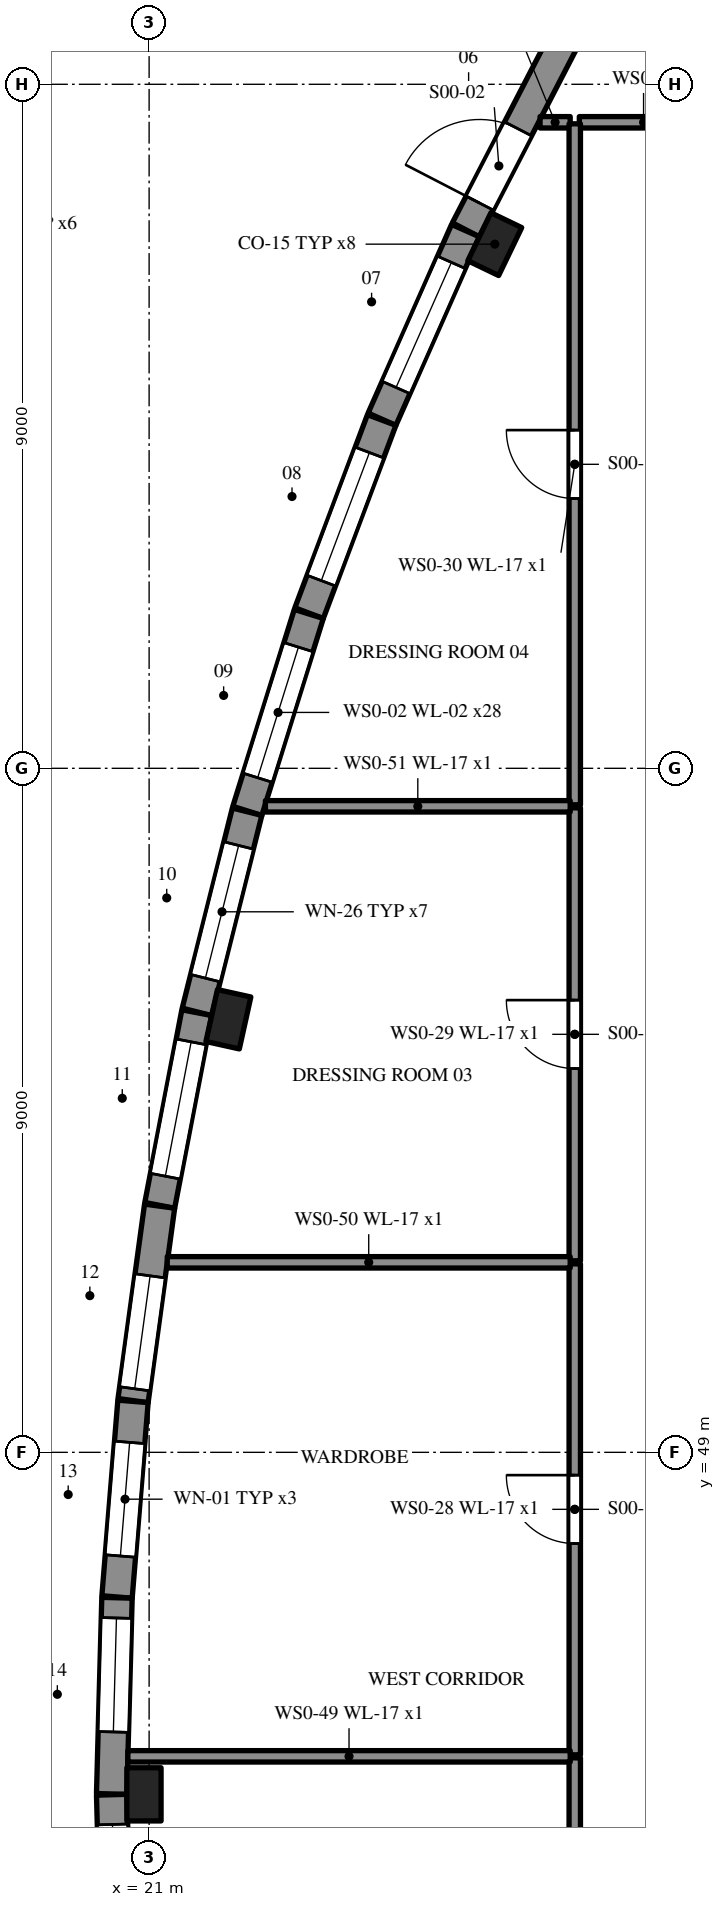
"""IFC4 building model, lengths in metres.
Left out: names, types, materials, properties, quantities, classifications, styles, units other than length and angle.
Written with IfcOpenShell. Run it as: python <this file> out.ifc"""

import sys

from ifc_helpers import new_model, si_unit, direction, frame, frame_2d, origin, origin_2d, place, context, subcontext, project, spatial, rectangle, extrude, element, fill, save


model = new_model("IFC4")
c1 = context("Model", 3, precision=1e-05, world=origin(), true_north=direction((0.0, 1.0)))
c2 = subcontext(c1, "Body", "Model", "MODEL_VIEW")
j1 = project(units=[si_unit("LENGTHUNIT", "METRE"), si_unit("PLANEANGLEUNIT", "RADIAN")], contexts=[c1])
p1 = place(None, origin())
s1 = spatial("IfcSite", under=j1, at=p1, CompositionType="ELEMENT")
p2 = place(p1, origin())
s2 = spatial("IfcBuilding", under=s1, at=p2, CompositionType="ELEMENT")
p3 = place(p2, origin())
s3 = spatial("IfcBuildingStorey", under=s2, at=p3, CompositionType="ELEMENT", Elevation=0.0)
p4 = place(p3, frame((26.572, 67.802, 0.0), z_axis=(0.0, 0.0, 1.0), x_axis=(-0.45930565039, -0.888278289457, 0.0)))
e1 = element("IfcWall", 1, at=p4, inside=s3, PredefinedType="SOLIDWALL", context=c2, shape_type="SweptSolid", body=[
    extrude(rectangle(XDim=3.059, YDim=0.4, at=frame_2d((1.529, 0.0))), origin(), (0.0, 0.0, 1.0), 5.1),
])
p5 = place(p4, frame((1.563, 0.0, 0.0)))
e2 = element("IfcOpeningElement", 2, at=p5, cuts=e1, PredefinedType="OPENING", context=c2, shape_type="SweptSolid", body=[
    extrude(rectangle(XDim=1.1, YDim=2.1, at=frame_2d((0.55, 1.05))), frame((0.0, 0.21, 0.0), z_axis=(0.0, -1.0, 0.0), x_axis=(1.0, 0.0, 0.0)), (0.0, 0.0, 1.0), 0.42),
])
p6 = place(p3, frame((25.162, 65.075, 0.0), z_axis=(0.0, 0.0, 1.0), x_axis=(-0.404652153757, -0.914470685402, 0.0)))
e3 = element("IfcWall", 3, at=p6, inside=s3, PredefinedType="SOLIDWALL", context=c2, shape_type="SweptSolid", body=[
    extrude(rectangle(XDim=2.714, YDim=0.4, at=frame_2d((1.357, 0.0))), origin(), (0.0, 0.0, 1.0), 5.1),
])
p7 = place(p6, frame((0.457, 0.0, 1.2)))
e4 = element("IfcOpeningElement", 4, at=p7, cuts=e3, PredefinedType="OPENING", context=c2, shape_type="SweptSolid", body=[
    extrude(rectangle(XDim=1.8, YDim=1.2, at=frame_2d((0.9, 0.6))), frame((0.0, 0.21, 0.0), z_axis=(0.0, -1.0, 0.0), x_axis=(1.0, 0.0, 0.0)), (0.0, 0.0, 1.0), 0.42),
])
p8 = place(p3, frame((24.06, 62.583, 0.0), z_axis=(0.0, 0.0, 1.0), x_axis=(-0.351862601417, -0.936051659752, 0.0)))
e5 = element("IfcWall", 5, at=p8, inside=s3, PredefinedType="SOLIDWALL", context=c2, shape_type="SweptSolid", body=[
    extrude(rectangle(XDim=2.714, YDim=0.4, at=frame_2d((1.357, 0.0))), origin(), (0.0, 0.0, 1.0), 5.1),
])
p9 = place(p8, frame((0.457, 0.0, 1.2)))
e6 = element("IfcOpeningElement", 6, at=p9, cuts=e5, PredefinedType="OPENING", context=c2, shape_type="SweptSolid", body=[
    extrude(rectangle(XDim=1.8, YDim=1.2, at=frame_2d((0.9, 0.6))), frame((0.0, 0.21, 0.0), z_axis=(0.0, -1.0, 0.0), x_axis=(1.0, 0.0, 0.0)), (0.0, 0.0, 1.0), 0.42),
])
p10 = place(p3, frame((23.101, 60.031, 0.0), z_axis=(0.0, 0.0, 1.0), x_axis=(-0.29795748067, -0.954579142718, 0.0)))
e7 = element("IfcWall", 7, at=p10, inside=s3, PredefinedType="SOLIDWALL", context=c2, shape_type="SweptSolid", body=[
    extrude(rectangle(XDim=2.715, YDim=0.4, at=frame_2d((1.357, 0.0))), origin(), (0.0, 0.0, 1.0), 5.1),
])
p11 = place(p10, frame((0.457, 0.0, 1.2)))
e8 = element("IfcOpeningElement", 8, at=p11, cuts=e7, PredefinedType="OPENING", context=c2, shape_type="SweptSolid", body=[
    extrude(rectangle(XDim=1.8, YDim=1.2, at=frame_2d((0.9, 0.6))), frame((0.0, 0.21, 0.0), z_axis=(0.0, -1.0, 0.0), x_axis=(1.0, 0.0, 0.0)), (0.0, 0.0, 1.0), 0.42),
])
p12 = place(p3, frame((22.289, 57.429, 0.0), z_axis=(0.0, 0.0, 1.0), x_axis=(-0.2430011368, -0.970026003525, 0.0)))
e9 = element("IfcWall", 9, at=p12, inside=s3, PredefinedType="SOLIDWALL", context=c2, shape_type="SweptSolid", body=[
    extrude(rectangle(XDim=2.715, YDim=0.4, at=frame_2d((1.357, 0.0))), origin(), (0.0, 0.0, 1.0), 5.1),
])
p13 = place(p12, frame((0.458, 0.0, 1.2)))
e10 = element("IfcOpeningElement", 10, at=p13, cuts=e9, PredefinedType="OPENING", context=c2, shape_type="SweptSolid", body=[
    extrude(rectangle(XDim=1.8, YDim=1.2, at=frame_2d((0.9, 0.6))), frame((0.0, 0.21, 0.0), z_axis=(0.0, -1.0, 0.0), x_axis=(1.0, 0.0, 0.0)), (0.0, 0.0, 1.0), 0.42),
])
p14 = place(p3, frame((21.627, 54.785, 0.0), z_axis=(0.0, 0.0, 1.0), x_axis=(-0.188763210152, -0.982022632373, 0.0)))
e11 = element("IfcWall", 11, at=p14, inside=s3, PredefinedType="SOLIDWALL", context=c2, shape_type="SweptSolid", body=[
    extrude(rectangle(XDim=2.582, YDim=0.4, at=frame_2d((1.291, 0.0))), origin(), (0.0, 0.0, 1.0), 5.1),
])
p15 = place(p14, frame((0.391, 0.0, 1.2)))
e12 = element("IfcOpeningElement", 12, at=p15, cuts=e11, PredefinedType="OPENING", context=c2, shape_type="SweptSolid", body=[
    extrude(rectangle(XDim=1.8, YDim=1.2, at=frame_2d((0.9, 0.6))), frame((0.0, 0.21, 0.0), z_axis=(0.0, -1.0, 0.0), x_axis=(1.0, 0.0, 0.0)), (0.0, 0.0, 1.0), 0.42),
])
p16 = place(p3, frame((21.138, 52.239, 0.0), z_axis=(0.0, 0.0, 1.0), x_axis=(-0.13522291824, -0.990815200924, 0.0)))
e13 = element("IfcWall", 13, at=p16, inside=s3, PredefinedType="SOLIDWALL", context=c2, shape_type="SweptSolid", body=[
    extrude(rectangle(XDim=2.582, YDim=0.4, at=frame_2d((1.291, 0.0))), origin(), (0.0, 0.0, 1.0), 5.1),
])
p17 = place(p16, frame((0.925, 0.0, 0.9)))
e14 = element("IfcOpeningElement", 14, at=p17, cuts=e13, PredefinedType="OPENING", context=c2, shape_type="SweptSolid", body=[
    extrude(rectangle(XDim=1.5, YDim=2.1, at=frame_2d((0.75, 1.05))), frame((0.0, 0.21, 0.0), z_axis=(0.0, -1.0, 0.0), x_axis=(1.0, 0.0, 0.0)), (0.0, 0.0, 1.0), 0.42),
])
p18 = place(p3, frame((20.788, 49.67, 0.0), z_axis=(0.0, 0.0, 1.0), x_axis=(-0.081323667998, -0.996687744995, 0.0)))
e15 = element("IfcWall", 15, at=p18, inside=s3, PredefinedType="SOLIDWALL", context=c2, shape_type="SweptSolid", body=[
    extrude(rectangle(XDim=2.582, YDim=0.4, at=frame_2d((1.291, 0.0))), origin(), (0.0, 0.0, 1.0), 5.1),
])
p19 = place(p18, frame((0.541, 0.0, 0.9)))
e16 = element("IfcOpeningElement", 16, at=p19, cuts=e15, PredefinedType="OPENING", context=c2, shape_type="SweptSolid", body=[
    extrude(rectangle(XDim=1.5, YDim=2.1, at=frame_2d((0.75, 1.05))), frame((0.0, 0.21, 0.0), z_axis=(0.0, -1.0, 0.0), x_axis=(1.0, 0.0, 0.0)), (0.0, 0.0, 1.0), 0.42),
])
p20 = place(p3, frame((20.577, 47.086, 0.0), z_axis=(0.0, 0.0, 1.0), x_axis=(-0.027139748682, -0.99963164918, 0.0)))
e17 = element("IfcWall", 17, at=p20, inside=s3, PredefinedType="SOLIDWALL", context=c2, shape_type="SweptSolid", body=[
    extrude(rectangle(XDim=2.582, YDim=0.4, at=frame_2d((1.291, 0.0))), origin(), (0.0, 0.0, 1.0), 5.1),
])
p21 = place(p20, frame((0.266, 0.0, 0.9)))
e18 = element("IfcOpeningElement", 18, at=p21, cuts=e17, PredefinedType="OPENING", context=c2, shape_type="SweptSolid", body=[
    extrude(rectangle(XDim=1.5, YDim=2.1, at=frame_2d((0.75, 1.05))), frame((0.0, 0.21, 0.0), z_axis=(0.0, -1.0, 0.0), x_axis=(1.0, 0.0, 0.0)), (0.0, 0.0, 1.0), 0.42),
])
p22 = place(p3, frame((20.507, 44.495, 0.0), z_axis=(0.0, 0.0, 1.0), x_axis=(0.027139748682, -0.99963164918, 0.0)))
e19 = element("IfcWall", 19, at=p22, inside=s3, PredefinedType="SOLIDWALL", context=c2, shape_type="SweptSolid", body=[
    extrude(rectangle(XDim=2.582, YDim=0.4, at=frame_2d((1.291, 0.0))), origin(), (0.0, 0.0, 1.0), 5.1),
])
p23 = place(p22, frame((0.391, 0.0, 1.2)))
e20 = element("IfcOpeningElement", 20, at=p23, cuts=e19, PredefinedType="OPENING", context=c2, shape_type="SweptSolid", body=[
    extrude(rectangle(XDim=1.8, YDim=1.2, at=frame_2d((0.9, 0.6))), frame((0.0, 0.21, 0.0), z_axis=(0.0, -1.0, 0.0), x_axis=(1.0, 0.0, 0.0)), (0.0, 0.0, 1.0), 0.42),
])
for number, where, z_axis, x_axis in (
    (21, (20.932, 44.5, 0.0), (0.0, 0.0, 1.0), (0.0, -1.0, 0.0)),
    (22, (22.043, 54.698, 0.0), (0.0, 0.0, 1.0), (-0.217, -0.976, 0.0)),
    (23, (25.548, 64.896, 0.0), (0.0, 0.0, 1.0), (-0.434, -0.901, 0.0)),
):
    element("IfcColumn", number, at=place(p3, frame(where, z_axis=z_axis, x_axis=x_axis)), inside=s3, PredefinedType="PILASTER", context=c2, shape_type="SweptSolid", body=[
        extrude(rectangle(XDim=0.7, YDim=0.45, at=origin_2d()), origin(), (0.0, 0.0, 1.0), 5.1),
    ])
p24 = place(p3, frame((28.351, 66.5, 0.0), z_axis=(0.0, 0.0, 1.0), x_axis=(-1.0, 0.0, 0.0)))
e24 = element("IfcWall", 24, at=p24, inside=s3, PredefinedType="PARTITIONING", context=c2, shape_type="SweptSolid", body=[
    extrude(rectangle(XDim=1.691, YDim=0.15, at=frame_2d((0.845, 0.0))), origin(), (0.0, 0.0, 1.0), 5.1),
])
p25 = place(p3, frame((26.54, 66.5, 0.0), z_axis=(0.0, 0.0, 1.0), x_axis=(-1.0, 0.0, 0.0)))
e25 = element("IfcWall", 25, at=p25, inside=s3, PredefinedType="PARTITIONING", context=c2, shape_type="SweptSolid", body=[
    extrude(rectangle(XDim=0.397, YDim=0.15, at=frame_2d((0.198, 0.0))), origin(), (0.0, 0.0, 1.0), 5.1),
])
p26 = place(p3, frame((26.6, 38.52, 0.0), z_axis=(0.0, 0.0, 1.0), x_axis=(0.0, 1.0, 0.0)))
e26 = element("IfcWall", 26, at=p26, inside=s3, PredefinedType="PARTITIONING", context=c2, shape_type="SweptSolid", body=[
    extrude(rectangle(XDim=6.46, YDim=0.15, at=frame_2d((3.23, 0.0))), origin(), (0.0, 0.0, 1.0), 5.1),
])
p27 = place(p26, frame((2.78, 0.0, 0.0)))
e27 = element("IfcOpeningElement", 27, at=p27, cuts=e26, PredefinedType="OPENING", context=c2, shape_type="SweptSolid", body=[
    extrude(rectangle(XDim=0.9, YDim=2.1, at=frame_2d((0.45, 1.05))), frame((0.0, 0.085, 0.0), z_axis=(0.0, -1.0, 0.0), x_axis=(1.0, 0.0, 0.0)), (0.0, 0.0, 1.0), 0.17),
])
p28 = place(p3, frame((26.6, 45.02, 0.0), z_axis=(0.0, 0.0, 1.0), x_axis=(0.0, 1.0, 0.0)))
e28 = element("IfcWall", 28, at=p28, inside=s3, PredefinedType="PARTITIONING", context=c2, shape_type="SweptSolid", body=[
    extrude(rectangle(XDim=6.46, YDim=0.15, at=frame_2d((3.23, 0.0))), origin(), (0.0, 0.0, 1.0), 5.1),
])
p29 = place(p28, frame((2.78, 0.0, 0.0)))
e29 = element("IfcOpeningElement", 29, at=p29, cuts=e28, PredefinedType="OPENING", context=c2, shape_type="SweptSolid", body=[
    extrude(rectangle(XDim=0.9, YDim=2.1, at=frame_2d((0.45, 1.05))), frame((0.0, 0.085, 0.0), z_axis=(0.0, -1.0, 0.0), x_axis=(1.0, 0.0, 0.0)), (0.0, 0.0, 1.0), 0.17),
])
p30 = place(p3, frame((26.6, 51.52, 0.0), z_axis=(0.0, 0.0, 1.0), x_axis=(0.0, 1.0, 0.0)))
e30 = element("IfcWall", 30, at=p30, inside=s3, PredefinedType="PARTITIONING", context=c2, shape_type="SweptSolid", body=[
    extrude(rectangle(XDim=5.96, YDim=0.15, at=frame_2d((2.98, 0.0))), origin(), (0.0, 0.0, 1.0), 5.1),
])
p31 = place(p30, frame((2.53, 0.0, 0.0)))
e31 = element("IfcOpeningElement", 31, at=p31, cuts=e30, PredefinedType="OPENING", context=c2, shape_type="SweptSolid", body=[
    extrude(rectangle(XDim=0.9, YDim=2.1, at=frame_2d((0.45, 1.05))), frame((0.0, 0.085, 0.0), z_axis=(0.0, -1.0, 0.0), x_axis=(1.0, 0.0, 0.0)), (0.0, 0.0, 1.0), 0.17),
])
p32 = place(p3, frame((26.6, 57.52, 0.0), z_axis=(0.0, 0.0, 1.0), x_axis=(0.0, 1.0, 0.0)))
e32 = element("IfcWall", 32, at=p32, inside=s3, PredefinedType="PARTITIONING", context=c2, shape_type="SweptSolid", body=[
    extrude(rectangle(XDim=8.96, YDim=0.15, at=frame_2d((4.48, 0.0))), origin(), (0.0, 0.0, 1.0), 5.1),
])
p33 = place(p32, frame((4.03, 0.0, 0.0)))
e33 = element("IfcOpeningElement", 33, at=p33, cuts=e32, PredefinedType="OPENING", context=c2, shape_type="SweptSolid", body=[
    extrude(rectangle(XDim=0.9, YDim=2.1, at=frame_2d((0.45, 1.05))), frame((0.0, 0.085, 0.0), z_axis=(0.0, -1.0, 0.0), x_axis=(1.0, 0.0, 0.0)), (0.0, 0.0, 1.0), 0.17),
])
p34 = place(p3, frame((20.72, 45.0, 0.0), z_axis=(0.0, 0.0, 1.0), x_axis=(1.0, 0.0, 0.0)))
e34 = element("IfcWall", 34, at=p34, inside=s3, PredefinedType="PARTITIONING", context=c2, shape_type="SweptSolid", body=[
    extrude(rectangle(XDim=5.82, YDim=0.15, at=frame_2d((2.91, 0.0))), origin(), (0.0, 0.0, 1.0), 5.1),
])
p35 = place(p3, frame((21.239, 51.5, 0.0), z_axis=(0.0, 0.0, 1.0), x_axis=(1.0, 0.0, 0.0)))
e35 = element("IfcWall", 35, at=p35, inside=s3, PredefinedType="PARTITIONING", context=c2, shape_type="SweptSolid", body=[
    extrude(rectangle(XDim=5.302, YDim=0.15, at=frame_2d((2.651, 0.0))), origin(), (0.0, 0.0, 1.0), 5.1),
])
p36 = place(p3, frame((22.53, 57.5, 0.0), z_axis=(0.0, 0.0, 1.0), x_axis=(1.0, 0.0, 0.0)))
e36 = element("IfcWall", 36, at=p36, inside=s3, PredefinedType="PARTITIONING", context=c2, shape_type="SweptSolid", body=[
    extrude(rectangle(XDim=4.01, YDim=0.15, at=frame_2d((2.005, 0.0))), origin(), (0.0, 0.0, 1.0), 5.1),
])
p37 = place(p5, frame((1.1, 0.0, 0.0), z_axis=(0.0, 0.0, 1.0), x_axis=(-1.0, 0.0, 0.0)))
e37 = element("IfcDoor", 37, at=p37, inside=s3, OperationType="SINGLE_SWING_LEFT", PredefinedType="DOOR", context=c2, shape_type="SweptSolid", body=[
    extrude(rectangle(XDim=1.1, YDim=2.1, at=frame_2d((0.55, 1.05))), frame((0.0, 0.025, 0.0), z_axis=(0.0, -1.0, 0.0), x_axis=(1.0, 0.0, 0.0)), (0.0, 0.0, 1.0), 0.05),
])
fill(e2, e37)
p38 = place(p7, origin())
e38 = element("IfcWindow", 38, at=p38, inside=s3, PartitioningType="SINGLE_PANEL", PredefinedType="WINDOW", context=c2, shape_type="SweptSolid", body=[
    extrude(rectangle(XDim=1.8, YDim=1.2, at=frame_2d((0.9, 0.6))), frame((0.0, 0.03, 0.0), z_axis=(0.0, -1.0, 0.0), x_axis=(1.0, 0.0, 0.0)), (0.0, 0.0, 1.0), 0.06),
])
fill(e4, e38)
p39 = place(p9, origin())
e39 = element("IfcWindow", 39, at=p39, inside=s3, PartitioningType="SINGLE_PANEL", PredefinedType="WINDOW", context=c2, shape_type="SweptSolid", body=[
    extrude(rectangle(XDim=1.8, YDim=1.2, at=frame_2d((0.9, 0.6))), frame((0.0, 0.03, 0.0), z_axis=(0.0, -1.0, 0.0), x_axis=(1.0, 0.0, 0.0)), (0.0, 0.0, 1.0), 0.06),
])
fill(e6, e39)
p40 = place(p11, origin())
e40 = element("IfcWindow", 40, at=p40, inside=s3, PartitioningType="SINGLE_PANEL", PredefinedType="WINDOW", context=c2, shape_type="SweptSolid", body=[
    extrude(rectangle(XDim=1.8, YDim=1.2, at=frame_2d((0.9, 0.6))), frame((0.0, 0.03, 0.0), z_axis=(0.0, -1.0, 0.0), x_axis=(1.0, 0.0, 0.0)), (0.0, 0.0, 1.0), 0.06),
])
fill(e8, e40)
p41 = place(p13, origin())
e41 = element("IfcWindow", 41, at=p41, inside=s3, PartitioningType="SINGLE_PANEL", PredefinedType="WINDOW", context=c2, shape_type="SweptSolid", body=[
    extrude(rectangle(XDim=1.8, YDim=1.2, at=frame_2d((0.9, 0.6))), frame((0.0, 0.03, 0.0), z_axis=(0.0, -1.0, 0.0), x_axis=(1.0, 0.0, 0.0)), (0.0, 0.0, 1.0), 0.06),
])
fill(e10, e41)
p42 = place(p15, origin())
e42 = element("IfcWindow", 42, at=p42, inside=s3, PartitioningType="SINGLE_PANEL", PredefinedType="WINDOW", context=c2, shape_type="SweptSolid", body=[
    extrude(rectangle(XDim=1.8, YDim=1.2, at=frame_2d((0.9, 0.6))), frame((0.0, 0.03, 0.0), z_axis=(0.0, -1.0, 0.0), x_axis=(1.0, 0.0, 0.0)), (0.0, 0.0, 1.0), 0.06),
])
fill(e12, e42)
p43 = place(p17, origin())
e43 = element("IfcWindow", 43, at=p43, inside=s3, PartitioningType="SINGLE_PANEL", PredefinedType="WINDOW", context=c2, shape_type="SweptSolid", body=[
    extrude(rectangle(XDim=1.5, YDim=2.1, at=frame_2d((0.75, 1.05))), frame((0.0, 0.03, 0.0), z_axis=(0.0, -1.0, 0.0), x_axis=(1.0, 0.0, 0.0)), (0.0, 0.0, 1.0), 0.06),
])
fill(e14, e43)
p44 = place(p19, origin())
e44 = element("IfcWindow", 44, at=p44, inside=s3, PartitioningType="SINGLE_PANEL", PredefinedType="WINDOW", context=c2, shape_type="SweptSolid", body=[
    extrude(rectangle(XDim=1.5, YDim=2.1, at=frame_2d((0.75, 1.05))), frame((0.0, 0.03, 0.0), z_axis=(0.0, -1.0, 0.0), x_axis=(1.0, 0.0, 0.0)), (0.0, 0.0, 1.0), 0.06),
])
fill(e16, e44)
p45 = place(p21, origin())
e45 = element("IfcWindow", 45, at=p45, inside=s3, PartitioningType="SINGLE_PANEL", PredefinedType="WINDOW", context=c2, shape_type="SweptSolid", body=[
    extrude(rectangle(XDim=1.5, YDim=2.1, at=frame_2d((0.75, 1.05))), frame((0.0, 0.03, 0.0), z_axis=(0.0, -1.0, 0.0), x_axis=(1.0, 0.0, 0.0)), (0.0, 0.0, 1.0), 0.06),
])
fill(e18, e45)
p46 = place(p23, origin())
e46 = element("IfcWindow", 46, at=p46, inside=s3, PartitioningType="SINGLE_PANEL", PredefinedType="WINDOW", context=c2, shape_type="SweptSolid", body=[
    extrude(rectangle(XDim=1.8, YDim=1.2, at=frame_2d((0.9, 0.6))), frame((0.0, 0.03, 0.0), z_axis=(0.0, -1.0, 0.0), x_axis=(1.0, 0.0, 0.0)), (0.0, 0.0, 1.0), 0.06),
])
fill(e20, e46)
p47 = place(p29, origin())
e47 = element("IfcDoor", 47, at=p47, inside=s3, OperationType="SINGLE_SWING_RIGHT", PredefinedType="DOOR", context=c2, shape_type="SweptSolid", body=[
    extrude(rectangle(XDim=0.9, YDim=2.1, at=frame_2d((0.45, 1.05))), frame((0.0, 0.025, 0.0), z_axis=(0.0, -1.0, 0.0), x_axis=(1.0, 0.0, 0.0)), (0.0, 0.0, 1.0), 0.05),
])
fill(e29, e47)
p48 = place(p31, origin())
e48 = element("IfcDoor", 48, at=p48, inside=s3, OperationType="SINGLE_SWING_RIGHT", PredefinedType="DOOR", context=c2, shape_type="SweptSolid", body=[
    extrude(rectangle(XDim=0.9, YDim=2.1, at=frame_2d((0.45, 1.05))), frame((0.0, 0.025, 0.0), z_axis=(0.0, -1.0, 0.0), x_axis=(1.0, 0.0, 0.0)), (0.0, 0.0, 1.0), 0.05),
])
fill(e31, e48)
p49 = place(p33, origin())
e49 = element("IfcDoor", 49, at=p49, inside=s3, OperationType="SINGLE_SWING_RIGHT", PredefinedType="DOOR", context=c2, shape_type="SweptSolid", body=[
    extrude(rectangle(XDim=0.9, YDim=2.1, at=frame_2d((0.45, 1.05))), frame((0.0, 0.025, 0.0), z_axis=(0.0, -1.0, 0.0), x_axis=(1.0, 0.0, 0.0)), (0.0, 0.0, 1.0), 0.05),
])
fill(e33, e49)
save(model, sys.argv[1])
